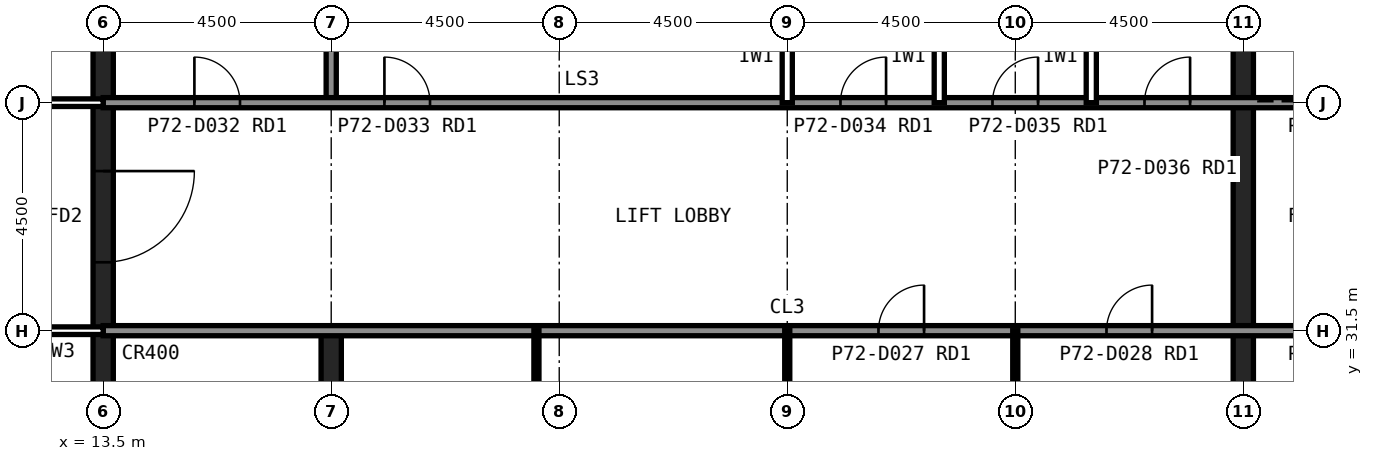
"""IFC4 building model, lengths in metres.
Left out: names, types, materials, properties, quantities, classifications, styles, units other than length and angle.
Written with IfcOpenShell. Run it as: python <this file> out.ifc"""

import sys

from ifc_helpers import new_model, si_unit, direction, frame, frame_2d, origin, place, context, subcontext, project, spatial, rectangle, extrude, element, fill, save


model = new_model("IFC4")
c1 = context("Model", 3, precision=1e-05, world=origin(), true_north=direction((0.0, 1.0)))
c2 = subcontext(c1, "Body", "Model", "MODEL_VIEW")
j1 = project(units=[si_unit("LENGTHUNIT", "METRE"), si_unit("PLANEANGLEUNIT", "RADIAN")], contexts=[c1])
p1 = place(None, origin())
s1 = spatial("IfcSite", under=j1, at=p1, CompositionType="ELEMENT")
p2 = place(p1, origin())
s2 = spatial("IfcBuilding", under=s1, at=p2, CompositionType="ELEMENT")
p3 = place(p2, frame((0.0, 0.0, 302.6)))
s3 = spatial("IfcBuildingStorey", under=s2, at=p3, CompositionType="ELEMENT", Elevation=302.6)
p4 = place(p3, frame((13.5, 40.5, 0.0), z_axis=(0.0, 0.0, 1.0), x_axis=(0.0, -1.0, 0.0)))
e1 = element("IfcWall", 1, at=p4, inside=s3, PredefinedType="SHEAR", context=c2, shape_type="SweptSolid", body=[
    extrude(rectangle(XDim=27.0, YDim=0.4, at=frame_2d((13.5, 0.0))), origin(), (0.0, 0.0, 1.0), 4.0),
])
p5 = place(p4, frame((19.65, 0.0, 0.0)))
e2 = element("IfcOpeningElement", 2, at=p5, cuts=e1, PredefinedType="OPENING", context=c2, shape_type="SweptSolid", body=[
    extrude(rectangle(XDim=1.2, YDim=2.1, at=frame_2d((0.6, 1.05))), frame((0.0, 0.21, 0.0), z_axis=(0.0, -1.0, 0.0), x_axis=(1.0, 0.0, 0.0)), (0.0, 0.0, 1.0), 0.42),
])
p6 = place(p4, frame((5.85, 0.0, 0.0)))
e3 = element("IfcOpeningElement", 3, at=p6, cuts=e1, PredefinedType="OPENING", context=c2, shape_type="SweptSolid", body=[
    extrude(rectangle(XDim=1.8, YDim=2.1, at=frame_2d((0.9, 1.05))), frame((0.0, 0.21, 0.0), z_axis=(0.0, -1.0, 0.0), x_axis=(1.0, 0.0, 0.0)), (0.0, 0.0, 1.0), 0.42),
])
p7 = place(p3, frame((18.0, 13.5, 0.0), z_axis=(0.0, 0.0, 1.0), x_axis=(0.0, 1.0, 0.0)))
e4 = element("IfcWall", 4, at=p7, inside=s3, PredefinedType="SHEAR", context=c2, shape_type="SweptSolid", body=[
    extrude(rectangle(XDim=18.0, YDim=0.4, at=frame_2d((9.0, 0.0))), origin(), (0.0, 0.0, 1.0), 4.0),
])
p8 = place(p3, frame((18.0, 36.0, 0.0), z_axis=(0.0, 0.0, 1.0), x_axis=(0.0, 1.0, 0.0)))
e5 = element("IfcWall", 5, at=p8, inside=s3, PredefinedType="SOLIDWALL", context=c2, shape_type="SweptSolid", body=[
    extrude(rectangle(XDim=4.5, YDim=0.2, at=frame_2d((2.25, 0.0))), origin(), (0.0, 0.0, 1.0), 3.84),
])
p9 = place(p3, frame((36.0, 22.5, 0.0), z_axis=(0.0, 0.0, 1.0), x_axis=(0.0, 1.0, 0.0)))
e6 = element("IfcWall", 6, at=p9, inside=s3, PredefinedType="SHEAR", context=c2, shape_type="SweptSolid", body=[
    extrude(rectangle(XDim=18.0, YDim=0.4, at=frame_2d((9.0, 0.0))), origin(), (0.0, 0.0, 1.0), 4.0),
])
p10 = place(p3, frame((13.5, 36.0, 0.0), z_axis=(0.0, 0.0, 1.0), x_axis=(1.0, 0.0, 0.0)))
e7 = element("IfcWall", 7, at=p10, inside=s3, PredefinedType="SOLIDWALL", context=c2, shape_type="SweptSolid", body=[
    extrude(rectangle(XDim=27.0, YDim=0.2, at=frame_2d((13.5, 0.0))), origin(), (0.0, 0.0, 1.0), 3.84),
])
p11 = place(p10, frame((1.8, 0.0, 0.0)))
e8 = element("IfcOpeningElement", 8, at=p11, cuts=e7, PredefinedType="OPENING", context=c2, shape_type="SweptSolid", body=[
    extrude(rectangle(XDim=0.9, YDim=2.1, at=frame_2d((0.45, 1.05))), frame((0.0, 0.11, 0.0), z_axis=(0.0, -1.0, 0.0), x_axis=(1.0, 0.0, 0.0)), (0.0, 0.0, 1.0), 0.22),
])
p12 = place(p10, frame((5.55, 0.0, 0.0)))
e9 = element("IfcOpeningElement", 9, at=p12, cuts=e7, PredefinedType="OPENING", context=c2, shape_type="SweptSolid", body=[
    extrude(rectangle(XDim=0.9, YDim=2.1, at=frame_2d((0.45, 1.05))), frame((0.0, 0.11, 0.0), z_axis=(0.0, -1.0, 0.0), x_axis=(1.0, 0.0, 0.0)), (0.0, 0.0, 1.0), 0.22),
])
p13 = place(p10, frame((14.55, 0.0, 0.0)))
e10 = element("IfcOpeningElement", 10, at=p13, cuts=e7, PredefinedType="OPENING", context=c2, shape_type="SweptSolid", body=[
    extrude(rectangle(XDim=0.9, YDim=2.1, at=frame_2d((0.45, 1.05))), frame((0.0, 0.11, 0.0), z_axis=(0.0, -1.0, 0.0), x_axis=(1.0, 0.0, 0.0)), (0.0, 0.0, 1.0), 0.22),
])
p14 = place(p10, frame((17.55, 0.0, 0.0)))
e11 = element("IfcOpeningElement", 11, at=p14, cuts=e7, PredefinedType="OPENING", context=c2, shape_type="SweptSolid", body=[
    extrude(rectangle(XDim=0.9, YDim=2.1, at=frame_2d((0.45, 1.05))), frame((0.0, 0.11, 0.0), z_axis=(0.0, -1.0, 0.0), x_axis=(1.0, 0.0, 0.0)), (0.0, 0.0, 1.0), 0.22),
])
p15 = place(p10, frame((20.55, 0.0, 0.0)))
e12 = element("IfcOpeningElement", 12, at=p15, cuts=e7, PredefinedType="OPENING", context=c2, shape_type="SweptSolid", body=[
    extrude(rectangle(XDim=0.9, YDim=2.1, at=frame_2d((0.45, 1.05))), frame((0.0, 0.11, 0.0), z_axis=(0.0, -1.0, 0.0), x_axis=(1.0, 0.0, 0.0)), (0.0, 0.0, 1.0), 0.22),
])
p16 = place(p10, frame((24.1, 0.0, 0.0)))
e13 = element("IfcOpeningElement", 13, at=p16, cuts=e7, PredefinedType="OPENING", context=c2, shape_type="SweptSolid", body=[
    extrude(rectangle(XDim=1.3, YDim=2.2, at=frame_2d((0.65, 1.1))), frame((0.0, 0.11, 0.0), z_axis=(0.0, -1.0, 0.0), x_axis=(1.0, 0.0, 0.0)), (0.0, 0.0, 1.0), 0.22),
])
p17 = place(p3, frame((13.5, 31.5, 0.0), z_axis=(0.0, 0.0, 1.0), x_axis=(1.0, 0.0, 0.0)))
e14 = element("IfcWall", 14, at=p17, inside=s3, PredefinedType="SOLIDWALL", context=c2, shape_type="SweptSolid", body=[
    extrude(rectangle(XDim=27.0, YDim=0.2, at=frame_2d((13.5, 0.0))), origin(), (0.0, 0.0, 1.0), 3.84),
])
p18 = place(p17, frame((24.15, 0.0, 0.0)))
e15 = element("IfcOpeningElement", 15, at=p18, cuts=e14, PredefinedType="OPENING", context=c2, shape_type="SweptSolid", body=[
    extrude(rectangle(XDim=1.2, YDim=2.1, at=frame_2d((0.6, 1.05))), frame((0.0, 0.11, 0.0), z_axis=(0.0, -1.0, 0.0), x_axis=(1.0, 0.0, 0.0)), (0.0, 0.0, 1.0), 0.22),
])
p19 = place(p17, frame((15.3, 0.0, 0.0)))
e16 = element("IfcOpeningElement", 16, at=p19, cuts=e14, PredefinedType="OPENING", context=c2, shape_type="SweptSolid", body=[
    extrude(rectangle(XDim=0.9, YDim=2.1, at=frame_2d((0.45, 1.05))), frame((0.0, 0.11, 0.0), z_axis=(0.0, -1.0, 0.0), x_axis=(1.0, 0.0, 0.0)), (0.0, 0.0, 1.0), 0.22),
])
p20 = place(p17, frame((19.8, 0.0, 0.0)))
e17 = element("IfcOpeningElement", 17, at=p20, cuts=e14, PredefinedType="OPENING", context=c2, shape_type="SweptSolid", body=[
    extrude(rectangle(XDim=0.9, YDim=2.1, at=frame_2d((0.45, 1.05))), frame((0.0, 0.11, 0.0), z_axis=(0.0, -1.0, 0.0), x_axis=(1.0, 0.0, 0.0)), (0.0, 0.0, 1.0), 0.22),
])
for number, where, z_axis, x_axis in (
    (18, (27.0, 36.0, 0.0), (0.0, 0.0, 1.0), (0.0, 1.0, 0.0)),
    (19, (30.0, 36.0, 0.0), (0.0, 0.0, 1.0), (0.0, 1.0, 0.0)),
    (20, (33.0, 36.0, 0.0), (0.0, 0.0, 1.0), (0.0, 1.0, 0.0)),
):
    element("IfcWall", number, at=place(p3, frame(where, z_axis=z_axis, x_axis=x_axis)), inside=s3, PredefinedType="PARTITIONING", context=c2, shape_type="SweptSolid", body=[
        extrude(rectangle(XDim=4.5, YDim=0.2, at=frame_2d((2.25, 0.0))), origin(), (0.0, 0.0, 1.0), 3.84),
    ])
for number, where, z_axis, x_axis in (
    (21, (22.05, 22.5, 0.0), (0.0, 0.0, 1.0), (0.0, 1.0, 0.0)),
    (22, (27.0, 22.5, 0.0), (0.0, 0.0, 1.0), (0.0, 1.0, 0.0)),
    (23, (31.5, 22.5, 0.0), (0.0, 0.0, 1.0), (0.0, 1.0, 0.0)),
):
    element("IfcWall", number, at=place(p3, frame(where, z_axis=z_axis, x_axis=x_axis)), inside=s3, PredefinedType="PLUMBINGWALL", context=c2, shape_type="SweptSolid", body=[
        extrude(rectangle(XDim=9.0, YDim=0.1, at=frame_2d((4.5, 0.0))), origin(), (0.0, 0.0, 1.0), 3.84),
    ])
p21 = place(p3, frame((13.5, 31.5, 0.0), z_axis=(0.0, 0.0, 1.0), x_axis=(-1.0, 0.0, 0.0)))
e24 = element("IfcWall", 24, at=p21, inside=s3, PredefinedType="PARTITIONING", context=c2, shape_type="SweptSolid", body=[
    extrude(rectangle(XDim=4.5, YDim=0.15, at=frame_2d((2.25, 0.0))), origin(), (0.0, 0.0, 1.0), 2.989),
])
p22 = place(p21, frame((1.75, 0.0, 0.0)))
e25 = element("IfcOpeningElement", 25, at=p22, cuts=e24, PredefinedType="OPENING", context=c2, shape_type="SweptSolid", body=[
    extrude(rectangle(XDim=1.0, YDim=2.1, at=frame_2d((0.5, 1.05))), frame((0.0, 0.085, 0.0), z_axis=(0.0, -1.0, 0.0), x_axis=(1.0, 0.0, 0.0)), (0.0, 0.0, 1.0), 0.17),
])
p23 = place(p3, frame((8.1, 36.0, 0.0), z_axis=(0.0, 0.0, 1.0), x_axis=(1.0, 0.0, 0.0)))
e26 = element("IfcWall", 26, at=p23, inside=s3, PredefinedType="PARTITIONING", context=c2, shape_type="SweptSolid", body=[
    extrude(rectangle(XDim=5.4, YDim=0.15, at=frame_2d((2.7, 0.0))), origin(), (0.0, 0.0, 1.0), 2.989),
])
p24 = place(p23, frame((2.2, 0.0, 0.0)))
e27 = element("IfcOpeningElement", 27, at=p24, cuts=e26, PredefinedType="OPENING", context=c2, shape_type="SweptSolid", body=[
    extrude(rectangle(XDim=1.0, YDim=2.1, at=frame_2d((0.5, 1.05))), frame((0.0, 0.085, 0.0), z_axis=(0.0, -1.0, 0.0), x_axis=(1.0, 0.0, 0.0)), (0.0, 0.0, 1.0), 0.17),
])
p25 = place(p6, origin())
e28 = element("IfcDoor", 28, at=p25, inside=s3, OperationType="SINGLE_SWING_LEFT", PredefinedType="DOOR", context=c2, shape_type="SweptSolid", body=[
    extrude(rectangle(XDim=1.8, YDim=2.1, at=frame_2d((0.9, 1.05))), frame((0.0, 0.025, 0.0), z_axis=(0.0, -1.0, 0.0), x_axis=(1.0, 0.0, 0.0)), (0.0, 0.0, 1.0), 0.05),
])
fill(e3, e28)
p26 = place(p19, origin())
e29 = element("IfcDoor", 29, at=p26, inside=s3, OperationType="SINGLE_SWING_RIGHT", PredefinedType="DOOR", context=c2, shape_type="SweptSolid", body=[
    extrude(rectangle(XDim=0.9, YDim=2.1, at=frame_2d((0.45, 1.05))), frame((0.0, 0.025, 0.0), z_axis=(0.0, -1.0, 0.0), x_axis=(1.0, 0.0, 0.0)), (0.0, 0.0, 1.0), 0.05),
])
fill(e16, e29)
p27 = place(p20, origin())
e30 = element("IfcDoor", 30, at=p27, inside=s3, OperationType="SINGLE_SWING_RIGHT", PredefinedType="DOOR", context=c2, shape_type="SweptSolid", body=[
    extrude(rectangle(XDim=0.9, YDim=2.1, at=frame_2d((0.45, 1.05))), frame((0.0, 0.025, 0.0), z_axis=(0.0, -1.0, 0.0), x_axis=(1.0, 0.0, 0.0)), (0.0, 0.0, 1.0), 0.05),
])
fill(e17, e30)
p28 = place(p11, origin())
e31 = element("IfcDoor", 31, at=p28, inside=s3, OperationType="SINGLE_SWING_LEFT", PredefinedType="DOOR", context=c2, shape_type="SweptSolid", body=[
    extrude(rectangle(XDim=0.9, YDim=2.1, at=frame_2d((0.45, 1.05))), frame((0.0, 0.025, 0.0), z_axis=(0.0, -1.0, 0.0), x_axis=(1.0, 0.0, 0.0)), (0.0, 0.0, 1.0), 0.05),
])
fill(e8, e31)
p29 = place(p12, origin())
e32 = element("IfcDoor", 32, at=p29, inside=s3, OperationType="SINGLE_SWING_LEFT", PredefinedType="DOOR", context=c2, shape_type="SweptSolid", body=[
    extrude(rectangle(XDim=0.9, YDim=2.1, at=frame_2d((0.45, 1.05))), frame((0.0, 0.025, 0.0), z_axis=(0.0, -1.0, 0.0), x_axis=(1.0, 0.0, 0.0)), (0.0, 0.0, 1.0), 0.05),
])
fill(e9, e32)
p30 = place(p13, origin())
e33 = element("IfcDoor", 33, at=p30, inside=s3, OperationType="SINGLE_SWING_RIGHT", PredefinedType="DOOR", context=c2, shape_type="SweptSolid", body=[
    extrude(rectangle(XDim=0.9, YDim=2.1, at=frame_2d((0.45, 1.05))), frame((0.0, 0.025, 0.0), z_axis=(0.0, -1.0, 0.0), x_axis=(1.0, 0.0, 0.0)), (0.0, 0.0, 1.0), 0.05),
])
fill(e10, e33)
p31 = place(p14, origin())
e34 = element("IfcDoor", 34, at=p31, inside=s3, OperationType="SINGLE_SWING_RIGHT", PredefinedType="DOOR", context=c2, shape_type="SweptSolid", body=[
    extrude(rectangle(XDim=0.9, YDim=2.1, at=frame_2d((0.45, 1.05))), frame((0.0, 0.025, 0.0), z_axis=(0.0, -1.0, 0.0), x_axis=(1.0, 0.0, 0.0)), (0.0, 0.0, 1.0), 0.05),
])
fill(e11, e34)
p32 = place(p15, origin())
e35 = element("IfcDoor", 35, at=p32, inside=s3, OperationType="SINGLE_SWING_RIGHT", PredefinedType="DOOR", context=c2, shape_type="SweptSolid", body=[
    extrude(rectangle(XDim=0.9, YDim=2.1, at=frame_2d((0.45, 1.05))), frame((0.0, 0.025, 0.0), z_axis=(0.0, -1.0, 0.0), x_axis=(1.0, 0.0, 0.0)), (0.0, 0.0, 1.0), 0.05),
])
fill(e12, e35)
save(model, sys.argv[1])
